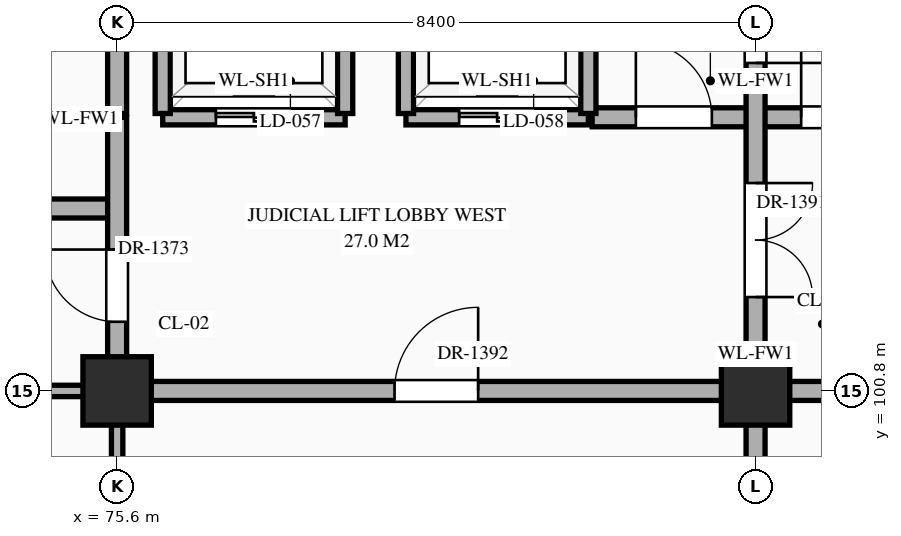
"""IFC4 building model, lengths in metres.
Left out: names, types, materials, properties, quantities, classifications, styles, units other than length and angle.
Written with IfcOpenShell. Run it as: python <this file> out.ifc"""

import sys

from ifc_helpers import new_model, si_unit, direction, frame, frame_2d, origin, origin_2d, place, context, subcontext, project, spatial, rectangle, extrude, element, fill, save


model = new_model("IFC4")
c1 = context("Model", 3, precision=1e-05, world=origin(), true_north=direction((0.0, 1.0)))
c2 = subcontext(c1, "Body", "Model", "MODEL_VIEW")
j1 = project(units=[si_unit("LENGTHUNIT", "METRE"), si_unit("PLANEANGLEUNIT", "RADIAN")], contexts=[c1])
p1 = place(None, origin())
s1 = spatial("IfcSite", under=j1, at=p1, CompositionType="ELEMENT")
p2 = place(p1, origin())
s2 = spatial("IfcBuilding", under=s1, at=p2, CompositionType="ELEMENT")
p3 = place(p2, frame((0.0, 0.0, 10.8)))
s3 = spatial("IfcBuildingStorey", under=s2, at=p3, CompositionType="ELEMENT", Elevation=10.8)
for number, where, z_axis, x_axis in (
    (1, (75.6, 100.8, 0.0), (0.0, 0.0, 1.0), (1.0, 0.0, 0.0)),
    (2, (84.0, 100.8, 0.0), (0.0, 0.0, 1.0), (1.0, 0.0, 0.0)),
):
    element("IfcColumn", number, at=place(p3, frame(where, z_axis=z_axis, x_axis=x_axis)), inside=s3, PredefinedType="COLUMN", context=c2, shape_type="SweptSolid", body=[
        extrude(rectangle(XDim=0.9, YDim=0.9, at=origin_2d()), origin(), (0.0, 0.0, 1.0), 5.4),
    ])
p4 = place(p3, frame((71.4, 100.8, 0.0), z_axis=(0.0, 0.0, 1.0), x_axis=(1.0, 0.0, 0.0)))
e3 = element("IfcWall", 3, at=p4, inside=s3, PredefinedType="STANDARD", context=c2, shape_type="SweptSolid", body=[
    extrude(rectangle(XDim=4.2, YDim=0.15, at=frame_2d((2.1, 0.0))), origin(), (0.0, 0.0, 1.0), 4.27),
])
p5 = place(p4, frame((1.465, 0.0, 0.0)))
e4 = element("IfcOpeningElement", 4, at=p5, cuts=e3, PredefinedType="OPENING", context=c2, shape_type="SweptSolid", body=[
    extrude(rectangle(XDim=0.9, YDim=2.15, at=frame_2d((0.45, 1.075))), frame((0.0, 0.087, 0.0), z_axis=(0.0, -1.0, 0.0), x_axis=(1.0, 0.0, 0.0)), (0.0, 0.0, 1.0), 0.174),
])
p6 = place(p3, frame((75.6, 100.8, 0.0), z_axis=(0.0, 0.0, 1.0), x_axis=(1.0, 0.0, 0.0)))
e5 = element("IfcWall", 5, at=p6, inside=s3, PredefinedType="STANDARD", context=c2, shape_type="SweptSolid", body=[
    extrude(rectangle(XDim=16.8, YDim=0.25, at=frame_2d((8.4, 0.0))), origin(), (0.0, 0.0, 1.0), 4.27),
])
p7 = place(p6, frame((3.65, 0.0, 0.0)))
e6 = element("IfcOpeningElement", 6, at=p7, cuts=e5, PredefinedType="OPENING", context=c2, shape_type="SweptSolid", body=[
    extrude(rectangle(XDim=1.1, YDim=2.2, at=frame_2d((0.55, 1.1))), frame((0.0, 0.137, 0.0), z_axis=(0.0, -1.0, 0.0), x_axis=(1.0, 0.0, 0.0)), (0.0, 0.0, 1.0), 0.274),
])
p8 = place(p6, frame((9.81, 0.0, 0.0)))
e7 = element("IfcOpeningElement", 7, at=p8, cuts=e5, PredefinedType="OPENING", context=c2, shape_type="SweptSolid", body=[
    extrude(rectangle(XDim=0.95, YDim=2.15, at=frame_2d((0.475, 1.075))), frame((0.0, 0.137, 0.0), z_axis=(0.0, -1.0, 0.0), x_axis=(1.0, 0.0, 0.0)), (0.0, 0.0, 1.0), 0.274),
])
p9 = place(p6, frame((12.45, 0.0, 0.0)))
e8 = element("IfcOpeningElement", 8, at=p9, cuts=e5, PredefinedType="OPENING", context=c2, shape_type="SweptSolid", body=[
    extrude(rectangle(XDim=1.1, YDim=2.2, at=frame_2d((0.55, 1.1))), frame((0.0, 0.137, 0.0), z_axis=(0.0, -1.0, 0.0), x_axis=(1.0, 0.0, 0.0)), (0.0, 0.0, 1.0), 0.274),
])
p10 = place(p6, frame((14.815, 0.0, 0.0)))
e9 = element("IfcOpeningElement", 9, at=p10, cuts=e5, PredefinedType="OPENING", context=c2, shape_type="SweptSolid", body=[
    extrude(rectangle(XDim=1.0, YDim=2.2, at=frame_2d((0.5, 1.1))), frame((0.0, 0.137, 0.0), z_axis=(0.0, -1.0, 0.0), x_axis=(1.0, 0.0, 0.0)), (0.0, 0.0, 1.0), 0.274),
])
p11 = place(p3, frame((71.4, 103.2, 0.0), z_axis=(0.0, 0.0, 1.0), x_axis=(1.0, 0.0, 0.0)))
e10 = element("IfcWall", 10, at=p11, inside=s3, PredefinedType="STANDARD", context=c2, shape_type="SweptSolid", body=[
    extrude(rectangle(XDim=4.2, YDim=0.25, at=frame_2d((2.1, 0.0))), origin(), (0.0, 0.0, 1.0), 5.12),
])
p12 = place(p11, frame((1.6, 0.0, 0.0)))
e11 = element("IfcOpeningElement", 11, at=p12, cuts=e10, PredefinedType="OPENING", context=c2, shape_type="SweptSolid", body=[
    extrude(rectangle(XDim=1.0, YDim=2.2, at=frame_2d((0.5, 1.1))), frame((0.0, 0.137, 0.0), z_axis=(0.0, -1.0, 0.0), x_axis=(1.0, 0.0, 0.0)), (0.0, 0.0, 1.0), 0.274),
])
p13 = place(p3, frame((76.2, 104.4, 0.0), z_axis=(0.0, 0.0, 1.0), x_axis=(1.0, 0.0, 0.0)))
e12 = element("IfcWall", 12, at=p13, inside=s3, PredefinedType="STANDARD", context=c2, shape_type="SweptSolid", body=[
    extrude(rectangle(XDim=2.4, YDim=0.2, at=frame_2d((1.2, 0.0))), origin(), (0.0, 0.0, 1.0), 5.12),
])
p14 = place(p13, frame((0.7, 0.0, 0.0)))
e13 = element("IfcOpeningElement", 13, at=p14, cuts=e12, PredefinedType="OPENING", context=c2, shape_type="SweptSolid", body=[
    extrude(rectangle(XDim=1.0, YDim=2.15, at=frame_2d((0.5, 1.075))), frame((0.0, 0.112, 0.0), z_axis=(0.0, -1.0, 0.0), x_axis=(1.0, 0.0, 0.0)), (0.0, 0.0, 1.0), 0.224),
])
p15 = place(p3, frame((79.4, 104.4, 0.0), z_axis=(0.0, 0.0, 1.0), x_axis=(1.0, 0.0, 0.0)))
e14 = element("IfcWall", 14, at=p15, inside=s3, PredefinedType="STANDARD", context=c2, shape_type="SweptSolid", body=[
    extrude(rectangle(XDim=2.4, YDim=0.2, at=frame_2d((1.2, 0.0))), origin(), (0.0, 0.0, 1.0), 5.12),
])
p16 = place(p15, frame((0.7, 0.0, 0.0)))
e15 = element("IfcOpeningElement", 15, at=p16, cuts=e14, PredefinedType="OPENING", context=c2, shape_type="SweptSolid", body=[
    extrude(rectangle(XDim=1.0, YDim=2.15, at=frame_2d((0.5, 1.075))), frame((0.0, 0.112, 0.0), z_axis=(0.0, -1.0, 0.0), x_axis=(1.0, 0.0, 0.0)), (0.0, 0.0, 1.0), 0.224),
])
p17 = place(p3, frame((81.85, 104.4, 0.0), z_axis=(0.0, 0.0, 1.0), x_axis=(1.0, 0.0, 0.0)))
e16 = element("IfcWall", 16, at=p17, inside=s3, PredefinedType="STANDARD", context=c2, shape_type="SweptSolid", body=[
    extrude(rectangle(XDim=4.3, YDim=0.25, at=frame_2d((2.15, 0.0))), origin(), (0.0, 0.0, 1.0), 5.12),
])
p18 = place(p17, frame((0.575, 0.0, 0.0)))
e17 = element("IfcOpeningElement", 17, at=p18, cuts=e16, PredefinedType="OPENING", context=c2, shape_type="SweptSolid", body=[
    extrude(rectangle(XDim=1.0, YDim=2.2, at=frame_2d((0.5, 1.1))), frame((0.0, 0.137, 0.0), z_axis=(0.0, -1.0, 0.0), x_axis=(1.0, 0.0, 0.0)), (0.0, 0.0, 1.0), 0.274),
])
p19 = place(p17, frame((2.75, 0.0, 0.0)))
e18 = element("IfcOpeningElement", 18, at=p19, cuts=e16, PredefinedType="OPENING", context=c2, shape_type="SweptSolid", body=[
    extrude(rectangle(XDim=0.95, YDim=2.15, at=frame_2d((0.475, 1.075))), frame((0.0, 0.137, 0.0), z_axis=(0.0, -1.0, 0.0), x_axis=(1.0, 0.0, 0.0)), (0.0, 0.0, 1.0), 0.274),
])
p20 = place(p3, frame((75.6, 96.0, 0.0), z_axis=(0.0, 0.0, 1.0), x_axis=(0.0, 1.0, 0.0)))
e19 = element("IfcWall", 19, at=p20, inside=s3, PredefinedType="STANDARD", context=c2, shape_type="SweptSolid", body=[
    extrude(rectangle(XDim=4.8, YDim=0.15, at=frame_2d((2.4, 0.0))), origin(), (0.0, 0.0, 1.0), 4.37),
])
p21 = place(p3, frame((75.6, 100.8, 0.0), z_axis=(0.0, 0.0, 1.0), x_axis=(0.0, 1.0, 0.0)))
e20 = element("IfcWall", 20, at=p21, inside=s3, PredefinedType="STANDARD", context=c2, shape_type="SweptSolid", body=[
    extrude(rectangle(XDim=3.6, YDim=0.25, at=frame_2d((1.8, 0.0))), origin(), (0.0, 0.0, 1.0), 4.37),
])
p22 = place(p21, frame((0.91, 0.0, 0.0)))
e21 = element("IfcOpeningElement", 21, at=p22, cuts=e20, PredefinedType="OPENING", context=c2, shape_type="SweptSolid", body=[
    extrude(rectangle(XDim=0.95, YDim=2.15, at=frame_2d((0.475, 1.075))), frame((0.0, 0.137, 0.0), z_axis=(0.0, -1.0, 0.0), x_axis=(1.0, 0.0, 0.0)), (0.0, 0.0, 1.0), 0.274),
])
p23 = place(p3, frame((75.6, 104.45, 0.0), z_axis=(0.0, 0.0, 1.0), x_axis=(0.0, 1.0, 0.0)))
e22 = element("IfcWall", 22, at=p23, inside=s3, PredefinedType="STANDARD", context=c2, shape_type="SweptSolid", body=[
    extrude(rectangle(XDim=3.5, YDim=0.25, at=frame_2d((1.75, 0.0))), origin(), (0.0, 0.0, 1.0), 4.37),
])
for number, where, z_axis, x_axis in (
    (23, (76.2, 104.45, 0.0), (0.0, 0.0, 1.0), (0.0, 1.0, 0.0)),
    (24, (78.6, 104.45, 0.0), (0.0, 0.0, 1.0), (0.0, 1.0, 0.0)),
    (25, (79.4, 104.45, 0.0), (0.0, 0.0, 1.0), (0.0, 1.0, 0.0)),
    (26, (81.8, 104.45, 0.0), (0.0, 0.0, 1.0), (0.0, 1.0, 0.0)),
):
    element("IfcWall", number, at=place(p3, frame(where, z_axis=z_axis, x_axis=x_axis)), inside=s3, PredefinedType="STANDARD", context=c2, shape_type="SweptSolid", body=[
        extrude(rectangle(XDim=2.3, YDim=0.2, at=frame_2d((1.15, 0.0))), origin(), (0.0, 0.0, 1.0), 5.12),
    ])
p24 = place(p3, frame((84.0, 79.2, 0.0), z_axis=(0.0, 0.0, 1.0), x_axis=(0.0, 1.0, 0.0)))
e27 = element("IfcWall", 27, at=p24, inside=s3, PredefinedType="STANDARD", context=c2, shape_type="SweptSolid", body=[
    extrude(rectangle(XDim=35.96, YDim=0.25, at=frame_2d((17.98, 0.0))), origin(), (0.0, 0.0, 1.0), 4.37),
])
p25 = place(p24, frame((22.835, 0.0, 0.0)))
e28 = element("IfcOpeningElement", 28, at=p25, cuts=e27, PredefinedType="OPENING", context=c2, shape_type="SweptSolid", body=[
    extrude(rectangle(XDim=1.5, YDim=2.25, at=frame_2d((0.75, 1.125))), frame((0.0, 0.137, 0.0), z_axis=(0.0, -1.0, 0.0), x_axis=(1.0, 0.0, 0.0)), (0.0, 0.0, 1.0), 0.274),
])
p26 = place(p24, frame((12.465, 0.0, 0.0)))
e29 = element("IfcOpeningElement", 29, at=p26, cuts=e27, PredefinedType="OPENING", context=c2, shape_type="SweptSolid", body=[
    extrude(rectangle(XDim=1.1, YDim=2.2, at=frame_2d((0.55, 1.1))), frame((0.0, 0.137, 0.0), z_axis=(0.0, -1.0, 0.0), x_axis=(1.0, 0.0, 0.0)), (0.0, 0.0, 1.0), 0.274),
])
p27 = place(p24, frame((15.31, 0.0, 0.0)))
e30 = element("IfcOpeningElement", 30, at=p27, cuts=e27, PredefinedType="OPENING", context=c2, shape_type="SweptSolid", body=[
    extrude(rectangle(XDim=0.95, YDim=2.15, at=frame_2d((0.475, 1.075))), frame((0.0, 0.137, 0.0), z_axis=(0.0, -1.0, 0.0), x_axis=(1.0, 0.0, 0.0)), (0.0, 0.0, 1.0), 0.274),
])
p28 = place(p24, frame((25.915, 0.0, 0.0)))
e31 = element("IfcOpeningElement", 31, at=p28, cuts=e27, PredefinedType="OPENING", context=c2, shape_type="SweptSolid", body=[
    extrude(rectangle(XDim=1.8, YDim=2.35, at=frame_2d((0.9, 1.175))), frame((0.0, 0.137, 0.0), z_axis=(0.0, -1.0, 0.0), x_axis=(1.0, 0.0, 0.0)), (0.0, 0.0, 1.0), 0.274),
])
p29 = place(p24, frame((29.71, 0.0, 0.0)))
e32 = element("IfcOpeningElement", 32, at=p29, cuts=e27, PredefinedType="OPENING", context=c2, shape_type="SweptSolid", body=[
    extrude(rectangle(XDim=0.95, YDim=2.15, at=frame_2d((0.475, 1.075))), frame((0.0, 0.137, 0.0), z_axis=(0.0, -1.0, 0.0), x_axis=(1.0, 0.0, 0.0)), (0.0, 0.0, 1.0), 0.274),
])
p30 = place(p24, frame((5.265, 0.0, 0.0)))
e33 = element("IfcOpeningElement", 33, at=p30, cuts=e27, PredefinedType="OPENING", context=c2, shape_type="SweptSolid", body=[
    extrude(rectangle(XDim=1.1, YDim=2.2, at=frame_2d((0.55, 1.1))), frame((0.0, 0.137, 0.0), z_axis=(0.0, -1.0, 0.0), x_axis=(1.0, 0.0, 0.0)), (0.0, 0.0, 1.0), 0.274),
])
p31 = place(p14, origin())
e34 = element("IfcDoor", 34, at=p31, inside=s3, OperationType="DOUBLE_DOOR_SLIDING", PredefinedType="DOOR", context=c2, shape_type="SweptSolid", body=[
    extrude(rectangle(XDim=1.0, YDim=2.15, at=frame_2d((0.5, 1.075))), frame((0.0, 0.025, 0.0), z_axis=(0.0, -1.0, 0.0), x_axis=(1.0, 0.0, 0.0)), (0.0, 0.0, 1.0), 0.05),
])
fill(e13, e34)
p32 = place(p16, origin())
e35 = element("IfcDoor", 35, at=p32, inside=s3, OperationType="DOUBLE_DOOR_SLIDING", PredefinedType="DOOR", context=c2, shape_type="SweptSolid", body=[
    extrude(rectangle(XDim=1.0, YDim=2.15, at=frame_2d((0.5, 1.075))), frame((0.0, 0.025, 0.0), z_axis=(0.0, -1.0, 0.0), x_axis=(1.0, 0.0, 0.0)), (0.0, 0.0, 1.0), 0.05),
])
fill(e15, e35)
p33 = place(p22, origin())
e36 = element("IfcDoor", 36, at=p33, inside=s3, OperationType="SINGLE_SWING_RIGHT", PredefinedType="DOOR", context=c2, shape_type="SweptSolid", body=[
    extrude(rectangle(XDim=0.95, YDim=2.15, at=frame_2d((0.475, 1.075))), frame((0.0, 0.025, 0.0), z_axis=(0.0, -1.0, 0.0), x_axis=(1.0, 0.0, 0.0)), (0.0, 0.0, 1.0), 0.05),
])
fill(e21, e36)
p34 = place(p25, frame((1.5, 0.0, 0.0), z_axis=(0.0, 0.0, 1.0), x_axis=(-1.0, 0.0, 0.0)))
e37 = element("IfcDoor", 37, at=p34, inside=s3, OperationType="DOUBLE_DOOR_SINGLE_SWING", PredefinedType="DOOR", context=c2, shape_type="SweptSolid", body=[
    extrude(rectangle(XDim=1.5, YDim=2.25, at=frame_2d((0.75, 1.125))), frame((0.0, 0.025, 0.0), z_axis=(0.0, -1.0, 0.0), x_axis=(1.0, 0.0, 0.0)), (0.0, 0.0, 1.0), 0.05),
])
fill(e28, e37)
p35 = place(p7, origin())
e38 = element("IfcDoor", 38, at=p35, inside=s3, OperationType="SINGLE_SWING_RIGHT", PredefinedType="DOOR", context=c2, shape_type="SweptSolid", body=[
    extrude(rectangle(XDim=1.1, YDim=2.2, at=frame_2d((0.55, 1.1))), frame((0.0, 0.025, 0.0), z_axis=(0.0, -1.0, 0.0), x_axis=(1.0, 0.0, 0.0)), (0.0, 0.0, 1.0), 0.05),
])
fill(e6, e38)
p36 = place(p18, origin())
e39 = element("IfcDoor", 39, at=p36, inside=s3, OperationType="SINGLE_SWING_LEFT", PredefinedType="DOOR", context=c2, shape_type="SweptSolid", body=[
    extrude(rectangle(XDim=1.0, YDim=2.2, at=frame_2d((0.5, 1.1))), frame((0.0, 0.025, 0.0), z_axis=(0.0, -1.0, 0.0), x_axis=(1.0, 0.0, 0.0)), (0.0, 0.0, 1.0), 0.05),
])
fill(e17, e39)
p37 = place(p19, origin())
e40 = element("IfcDoor", 40, at=p37, inside=s3, OperationType="SINGLE_SWING_LEFT", PredefinedType="DOOR", context=c2, shape_type="SweptSolid", body=[
    extrude(rectangle(XDim=0.95, YDim=2.15, at=frame_2d((0.475, 1.075))), frame((0.0, 0.025, 0.0), z_axis=(0.0, -1.0, 0.0), x_axis=(1.0, 0.0, 0.0)), (0.0, 0.0, 1.0), 0.05),
])
fill(e18, e40)
p38 = place(p28, frame((1.8, 0.0, 0.0), z_axis=(0.0, 0.0, 1.0), x_axis=(-1.0, 0.0, 0.0)))
e41 = element("IfcDoor", 41, at=p38, inside=s3, OperationType="DOUBLE_DOOR_SINGLE_SWING", PredefinedType="DOOR", context=c2, shape_type="SweptSolid", body=[
    extrude(rectangle(XDim=1.8, YDim=2.35, at=frame_2d((0.9, 1.175))), frame((0.0, 0.025, 0.0), z_axis=(0.0, -1.0, 0.0), x_axis=(1.0, 0.0, 0.0)), (0.0, 0.0, 1.0), 0.05),
])
fill(e31, e41)
save(model, sys.argv[1])
